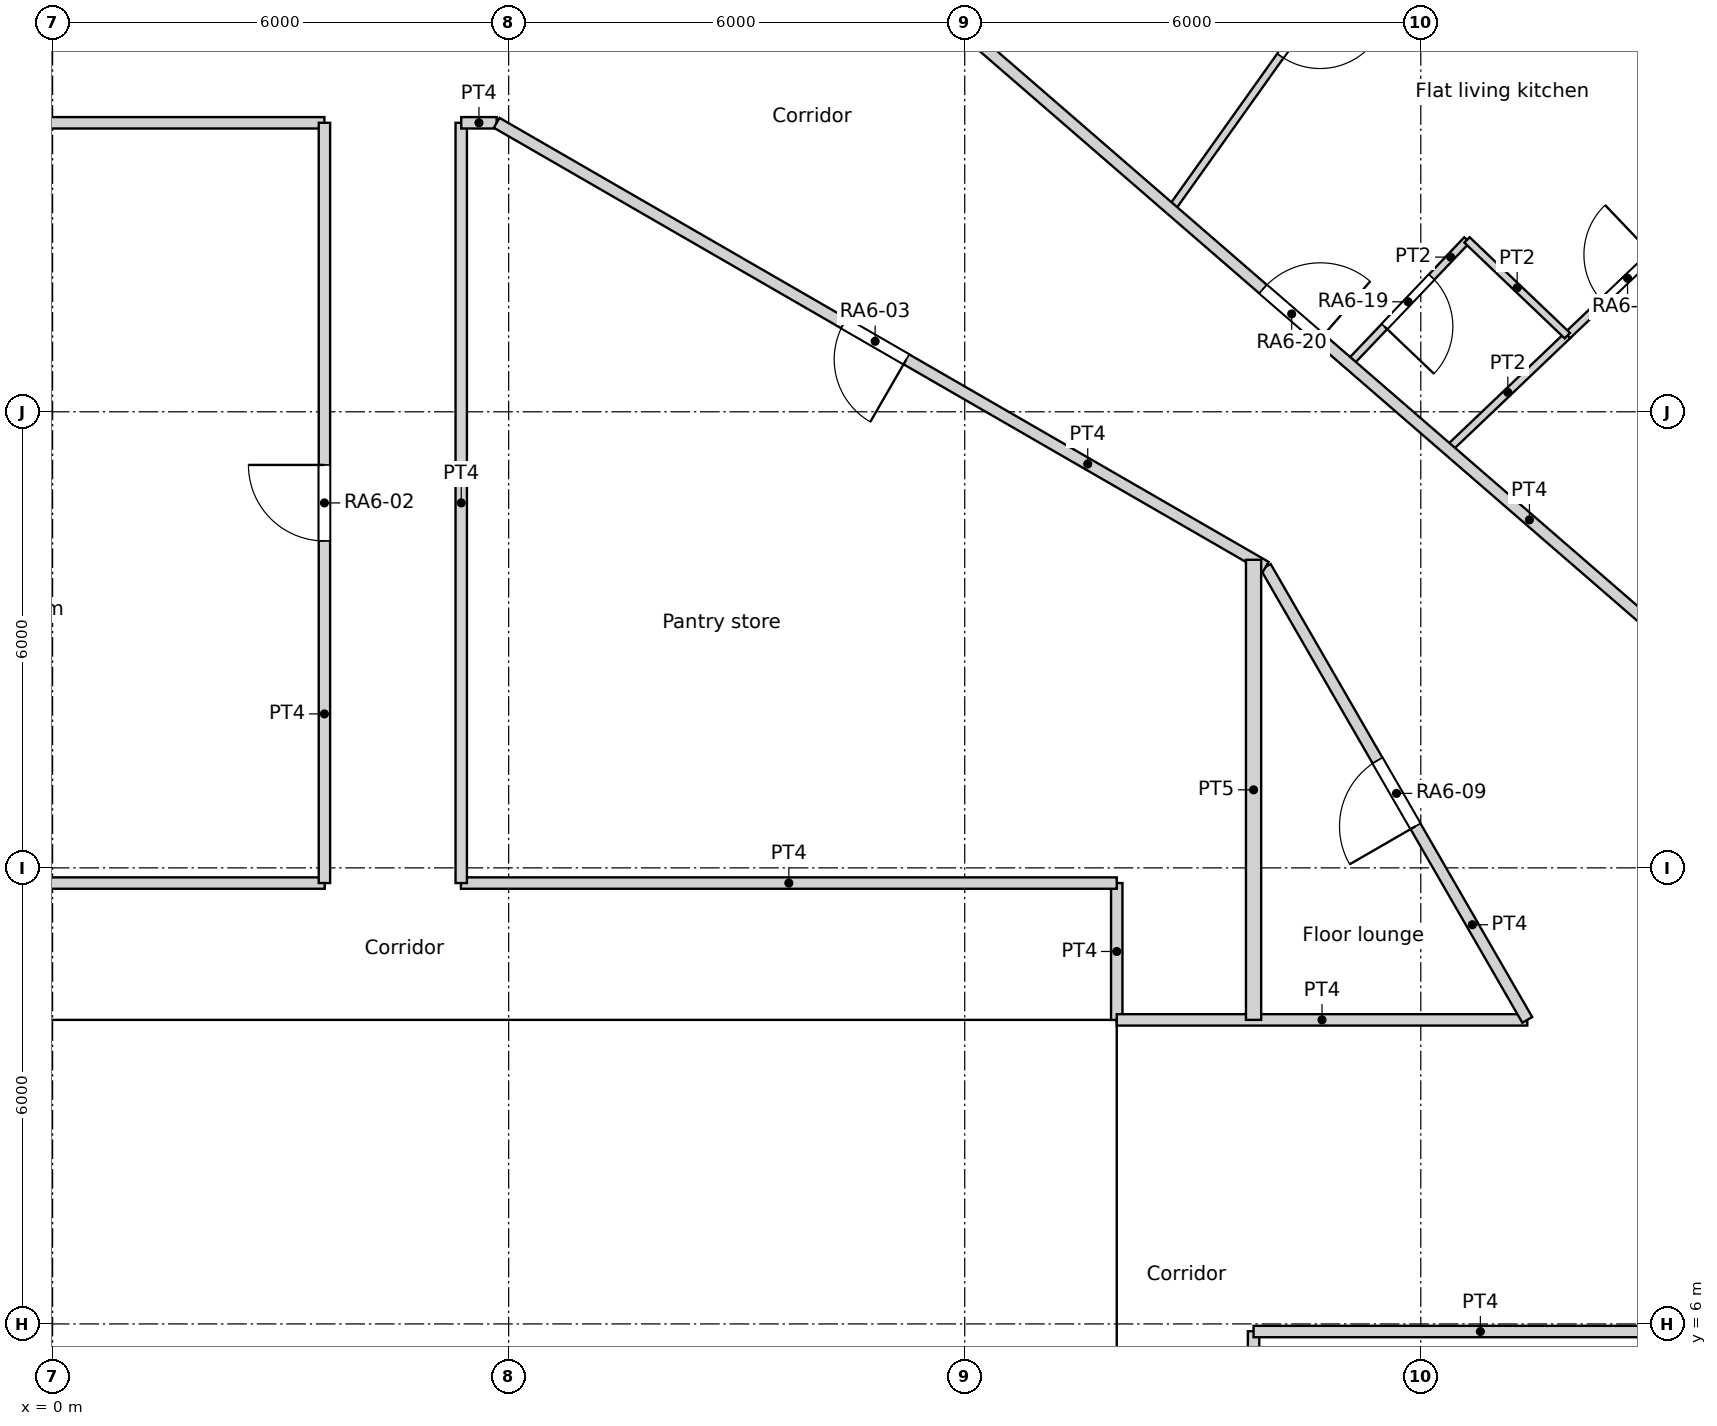
"""IFC4 building model, lengths in metres.
Left out: names, types, materials, properties, quantities, classifications, styles, units other than length and angle.
Written with IfcOpenShell. Run it as: python <this file> out.ifc"""

import sys

from ifc_helpers import new_model, si_unit, direction, frame, frame_2d, origin, origin_2d, place, context, subcontext, project, spatial, rectangle, circle, extrude, element, fill, save


model = new_model("IFC4")
c1 = context("Model", 3, precision=1e-05, world=origin(), true_north=direction((0.0, 1.0)))
c2 = subcontext(c1, "Body", "Model", "MODEL_VIEW")
j1 = project(units=[si_unit("LENGTHUNIT", "METRE"), si_unit("PLANEANGLEUNIT", "RADIAN")], contexts=[c1])
p1 = place(None, origin())
s1 = spatial("IfcSite", under=j1, at=p1, CompositionType="ELEMENT")
p2 = place(p1, origin())
s2 = spatial("IfcBuilding", under=s1, at=p2, CompositionType="ELEMENT")
p3 = place(p2, frame((0.0, 0.0, 82.2)))
s3 = spatial("IfcBuildingStorey", under=s2, at=p3, CompositionType="ELEMENT", Elevation=82.2)
for number, where, z_axis, x_axis in (
    (1, (18.805, 15.779, 0.0), (0.0, 0.0, 1.0), (1.0, 0.0, 0.0)),
    (2, (14.659, 19.69, 0.0), (0.0, 0.0, 1.0), (1.0, 0.0, 0.0)),
    (3, (9.723, 22.54, 0.0), (0.0, 0.0, 1.0), (1.0, 0.0, 0.0)),
):
    element("IfcColumn", number, at=place(p3, frame(where, z_axis=z_axis, x_axis=x_axis)), inside=s3, PredefinedType="COLUMN", context=c2, shape_type="SweptSolid", body=[
        extrude(circle(Radius=0.65, at=origin_2d()), origin(), (0.0, 0.0, 1.0), 3.6),
    ])
for number, where, z_axis, x_axis in (
    (4, (17.986, 5.548, 0.0), (0.0, 0.0, 1.0), (1.0, 0.0, 0.0)),
    (5, (15.552, 10.603, 0.0), (0.0, 0.0, 1.0), (1.0, 0.0, 0.0)),
    (6, (11.735, 14.716, 0.0), (0.0, 0.0, 1.0), (1.0, 0.0, 0.0)),
    (7, (6.876, 17.521, 0.0), (0.0, 0.0, 1.0), (1.0, 0.0, 0.0)),
    (8, (1.406, 18.77, 0.0), (0.0, 0.0, 1.0), (1.0, 0.0, 0.0)),
):
    element("IfcColumn", number, at=place(p3, frame(where, z_axis=z_axis, x_axis=x_axis)), inside=s3, PredefinedType="COLUMN", context=c2, shape_type="SweptSolid", body=[
        extrude(circle(Radius=0.7, at=origin_2d()), origin(), (0.0, 0.0, 1.0), 3.6),
    ])
p4 = place(p3, frame((22.707, 21.651, 0.0), z_axis=(0.0, 0.0, 1.0), x_axis=(-0.723744206617, 0.690068346896, 0.0)))
e9 = element("IfcWall", 9, at=p4, inside=s3, PredefinedType="SOLIDWALL", context=c2, shape_type="SweptSolid", body=[
    extrude(rectangle(XDim=2.98, YDim=0.3, at=frame_2d((1.49, 0.0))), origin(), (0.0, 0.0, 1.0), 3.15),
])
p5 = place(p4, frame((1.49, 0.0, 1.55)))
e10 = element("IfcOpeningElement", 10, at=p5, cuts=e9, PredefinedType="OPENING", context=c2, shape_type="SweptSolid", body=[
    extrude(circle(Radius=0.9, at=origin_2d()), frame((0.0, 0.16, 0.0), z_axis=(0.0, -1.0, 0.0), x_axis=(1.0, 0.0, 0.0)), (0.0, 0.0, 1.0), 0.32),
])
p6 = place(p3, frame((-14.0, 9.4, 0.0), z_axis=(0.0, 0.0, 1.0), x_axis=(1.0, 0.0, 0.0)))
e11 = element("IfcWall", 11, at=p6, inside=s3, PredefinedType="SOLIDWALL", context=c2, shape_type="SweptSolid", body=[
    extrude(rectangle(XDim=28.0, YDim=1.2, at=frame_2d((14.0, 0.0))), origin(), (0.0, 0.0, 1.0), 3.6),
])
p7 = place(p6, frame((9.8, 0.0, 0.0)))
e12 = element("IfcOpeningElement", 12, at=p7, cuts=e11, PredefinedType="OPENING", context=c2, shape_type="SweptSolid", body=[
    extrude(rectangle(XDim=1.8, YDim=2.1, at=frame_2d((0.9, 1.05))), frame((0.0, 0.6, 0.0), z_axis=(0.0, -1.0, 0.0), x_axis=(1.0, 0.0, 0.0)), (0.0, 0.0, 1.0), 1.2),
])
p8 = place(p3, frame((13.4, -8.8, 0.0), z_axis=(0.0, 0.0, 1.0), x_axis=(0.0, 1.0, 0.0)))
e13 = element("IfcWall", 13, at=p8, inside=s3, PredefinedType="SOLIDWALL", context=c2, shape_type="SweptSolid", body=[
    extrude(rectangle(XDim=17.6, YDim=1.2, at=frame_2d((8.8, 0.0))), origin(), (0.0, 0.0, 1.0), 3.6),
])
p9 = place(p8, frame((6.3, 0.0, 0.0)))
e14 = element("IfcOpeningElement", 14, at=p9, cuts=e13, PredefinedType="OPENING", context=c2, shape_type="SweptSolid", body=[
    extrude(rectangle(XDim=1.0, YDim=2.1, at=frame_2d((0.5, 1.05))), frame((0.0, 0.6, 0.0), z_axis=(0.0, -1.0, 0.0), x_axis=(1.0, 0.0, 0.0)), (0.0, 0.0, 1.0), 1.2),
])
for number, where, z_axis, x_axis in (
    (15, (0.55, 3.25, 0.0), (0.0, 0.0, 1.0), (0.0, 1.0, 0.0)),
    (16, (3.35, 3.25, 0.0), (0.0, 0.0, 1.0), (0.0, 1.0, 0.0)),
    (17, (6.15, 3.25, 0.0), (0.0, 0.0, 1.0), (0.0, 1.0, 0.0)),
):
    element("IfcWall", number, at=place(p3, frame(where, z_axis=z_axis, x_axis=x_axis)), inside=s3, PredefinedType="SOLIDWALL", context=c2, shape_type="SweptSolid", body=[
        extrude(rectangle(XDim=3.15, YDim=0.3, at=frame_2d((1.575, 0.0))), origin(), (0.0, 0.0, 1.0), 3.15),
    ])
p10 = place(p3, frame((9.05, -8.8, 0.0), z_axis=(0.0, 0.0, 1.0), x_axis=(0.0, 1.0, 0.0)))
e18 = element("IfcWall", 18, at=p10, inside=s3, PredefinedType="SOLIDWALL", context=c2, shape_type="SweptSolid", body=[
    extrude(rectangle(XDim=17.6, YDim=0.3, at=frame_2d((8.8, 0.0))), origin(), (0.0, 0.0, 1.0), 3.15),
])
p11 = place(p10, frame((8.8, 0.0, 0.0)))
e19 = element("IfcOpeningElement", 19, at=p11, cuts=e18, PredefinedType="OPENING", context=c2, shape_type="SweptSolid", body=[
    extrude(rectangle(XDim=1.8, YDim=2.1, at=frame_2d((0.9, 1.05))), frame((0.0, 0.15, 0.0), z_axis=(0.0, -1.0, 0.0), x_axis=(1.0, 0.0, 0.0)), (0.0, 0.0, 1.0), 0.3),
])
p12 = place(p3, frame((-8.9, 6.55, 0.0), z_axis=(0.0, 0.0, 1.0), x_axis=(1.0, 0.0, 0.0)))
e20 = element("IfcWall", 20, at=p12, inside=s3, PredefinedType="SOLIDWALL", context=c2, shape_type="SweptSolid", body=[
    extrude(rectangle(XDim=17.8, YDim=0.3, at=frame_2d((8.9, 0.0))), origin(), (0.0, 0.0, 1.0), 3.15),
])
p13 = place(p12, frame((4.75, 0.0, 0.0)))
e21 = element("IfcOpeningElement", 21, at=p13, cuts=e20, PredefinedType="OPENING", context=c2, shape_type="SweptSolid", body=[
    extrude(rectangle(XDim=1.7, YDim=2.1, at=frame_2d((0.85, 1.05))), frame((0.0, 0.15, 0.0), z_axis=(0.0, -1.0, 0.0), x_axis=(1.0, 0.0, 0.0)), (0.0, 0.0, 1.0), 0.3),
])
p14 = place(p3, frame((0.85, 6.7, 0.0), z_axis=(0.0, 0.0, 1.0), x_axis=(0.0, 1.0, 0.0)))
e22 = element("IfcWall", 22, at=p14, inside=s3, PredefinedType="SOLIDWALL", context=c2, shape_type="SweptSolid", body=[
    extrude(rectangle(XDim=2.1, YDim=0.3, at=frame_2d((1.05, 0.0))), origin(), (0.0, 0.0, 1.0), 3.15),
])
p15 = place(p3, frame((12.2, 4.7, 0.0), z_axis=(0.0, 0.0, 1.0), x_axis=(0.0, 1.0, 0.0)))
e23 = element("IfcWall", 23, at=p15, inside=s3, PredefinedType="SOLIDWALL", context=c2, shape_type="SweptSolid", body=[
    extrude(rectangle(XDim=4.1, YDim=1.2, at=frame_2d((2.05, 0.0))), origin(), (0.0, 0.0, 1.0), 3.15),
])
p16 = place(p3, frame((9.2, 8.2, 0.0), z_axis=(0.0, 0.0, 1.0), x_axis=(1.0, 0.0, 0.0)))
e24 = element("IfcWall", 24, at=p16, inside=s3, PredefinedType="SOLIDWALL", context=c2, shape_type="SweptSolid", body=[
    extrude(rectangle(XDim=2.4, YDim=1.2, at=frame_2d((1.2, 0.0))), origin(), (0.0, 0.0, 1.0), 3.15),
])
p17 = place(p3, frame((-4.164, 11.8, 0.0), z_axis=(0.0, 0.0, 1.0), x_axis=(1.0, 0.0, 0.0)))
e25 = element("IfcWall", 25, at=p17, inside=s3, PredefinedType="PARTITIONING", context=c2, shape_type="SweptSolid", body=[
    extrude(rectangle(XDim=7.744, YDim=0.15, at=frame_2d((3.872, 0.0))), origin(), (0.0, 0.0, 1.0), 3.15),
])
p18 = place(p3, frame((5.372, 11.8, 0.0), z_axis=(0.0, 0.0, 1.0), x_axis=(1.0, 0.0, 0.0)))
e26 = element("IfcWall", 26, at=p18, inside=s3, PredefinedType="PARTITIONING", context=c2, shape_type="SweptSolid", body=[
    extrude(rectangle(XDim=8.628, YDim=0.15, at=frame_2d((4.314, 0.0))), origin(), (0.0, 0.0, 1.0), 3.15),
])
p19 = place(p3, frame((14.0, 10.0, 0.0), z_axis=(0.0, 0.0, 1.0), x_axis=(0.0, 1.0, 0.0)))
e27 = element("IfcWall", 27, at=p19, inside=s3, PredefinedType="PARTITIONING", context=c2, shape_type="SweptSolid", body=[
    extrude(rectangle(XDim=1.8, YDim=0.15, at=frame_2d((0.9, 0.0))), origin(), (0.0, 0.0, 1.0), 3.15),
])
p20 = place(p3, frame((14.0, 10.0, 0.0), z_axis=(0.0, 0.0, 1.0), x_axis=(1.0, 0.0, 0.0)))
e28 = element("IfcWall", 28, at=p20, inside=s3, PredefinedType="PARTITIONING", context=c2, shape_type="SweptSolid", body=[
    extrude(rectangle(XDim=5.401, YDim=0.15, at=frame_2d((2.7, 0.0))), origin(), (0.0, 0.0, 1.0), 3.15),
])
p21 = place(p3, frame((15.8, -5.904, 0.0), z_axis=(0.0, 0.0, 1.0), x_axis=(0.0, 1.0, 0.0)))
e29 = element("IfcWall", 29, at=p21, inside=s3, PredefinedType="PARTITIONING", context=c2, shape_type="SweptSolid", body=[
    extrude(rectangle(XDim=11.808, YDim=0.15, at=frame_2d((5.904, 0.0))), origin(), (0.0, 0.0, 1.0), 3.15),
])
p22 = place(p21, frame((5.404, 0.0, 0.0)))
e30 = element("IfcOpeningElement", 30, at=p22, cuts=e29, PredefinedType="OPENING", context=c2, shape_type="SweptSolid", body=[
    extrude(rectangle(XDim=1.0, YDim=2.04, at=frame_2d((0.5, 1.02))), frame((0.0, 0.075, 0.0), z_axis=(0.0, -1.0, 0.0), x_axis=(1.0, 0.0, 0.0)), (0.0, 0.0, 1.0), 0.15),
])
p23 = place(p3, frame((15.8, 5.9, 0.0), z_axis=(0.0, 0.0, 1.0), x_axis=(1.0, 0.0, 0.0)))
e31 = element("IfcWall", 31, at=p23, inside=s3, PredefinedType="PARTITIONING", context=c2, shape_type="SweptSolid", body=[
    extrude(rectangle(XDim=5.968, YDim=0.15, at=frame_2d((2.984, 0.0))), origin(), (0.0, 0.0, 1.0), 3.15),
])
p24 = place(p3, frame((15.96, 15.96, 0.0), z_axis=(0.0, 0.0, 1.0), x_axis=(0.499992689227, -0.86602962462, 0.0)))
e32 = element("IfcWall", 32, at=p24, inside=s3, PredefinedType="PARTITIONING", context=c2, shape_type="SweptSolid", body=[
    extrude(rectangle(XDim=6.882, YDim=0.15, at=frame_2d((3.441, 0.0))), origin(), (0.0, 0.0, 1.0), 3.15),
])
p25 = place(p24, frame((2.941, 0.0, 0.0)))
e33 = element("IfcOpeningElement", 33, at=p25, cuts=e32, PredefinedType="OPENING", context=c2, shape_type="SweptSolid", body=[
    extrude(rectangle(XDim=1.0, YDim=2.04, at=frame_2d((0.5, 1.02))), frame((0.0, 0.075, 0.0), z_axis=(0.0, -1.0, 0.0), x_axis=(1.0, 0.0, 0.0)), (0.0, 0.0, 1.0), 0.15),
])
p26 = place(p3, frame((10.932, 23.939, 0.0), z_axis=(0.0, 0.0, 1.0), x_axis=(0.755823777664, -0.654775088956, 0.0)))
e34 = element("IfcWall", 34, at=p26, inside=s3, PredefinedType="PARTITIONING", context=c2, shape_type="SweptSolid", body=[
    extrude(rectangle(XDim=14.83, YDim=0.15, at=frame_2d((7.415, 0.0))), origin(), (0.0, 0.0, 1.0), 3.15),
])
p27 = place(p26, frame((6.604, 0.0, 0.0)))
e35 = element("IfcOpeningElement", 35, at=p27, cuts=e34, PredefinedType="OPENING", context=c2, shape_type="SweptSolid", body=[
    extrude(rectangle(XDim=1.0, YDim=2.1, at=frame_2d((0.5, 1.05))), frame((0.0, 0.075, 0.0), z_axis=(0.0, -1.0, 0.0), x_axis=(1.0, 0.0, 0.0)), (0.0, 0.0, 1.0), 0.15),
])
p28 = place(p3, frame((3.576, 11.8, 0.0), z_axis=(0.0, 0.0, 1.0), x_axis=(0.0, 1.0, 0.0)))
e36 = element("IfcWall", 36, at=p28, inside=s3, PredefinedType="PARTITIONING", context=c2, shape_type="SweptSolid", body=[
    extrude(rectangle(XDim=10.002, YDim=0.15, at=frame_2d((5.001, 0.0))), origin(), (0.0, 0.0, 1.0), 3.15),
])
p29 = place(p28, frame((4.501, 0.0, 0.0)))
e37 = element("IfcOpeningElement", 37, at=p29, cuts=e36, PredefinedType="OPENING", context=c2, shape_type="SweptSolid", body=[
    extrude(rectangle(XDim=1.0, YDim=2.04, at=frame_2d((0.5, 1.02))), frame((0.0, 0.075, 0.0), z_axis=(0.0, -1.0, 0.0), x_axis=(1.0, 0.0, 0.0)), (0.0, 0.0, 1.0), 0.15),
])
p30 = place(p3, frame((-4.16, 21.802, 0.0), z_axis=(0.0, 0.0, 1.0), x_axis=(1.0, 0.0, 0.0)))
e38 = element("IfcWall", 38, at=p30, inside=s3, PredefinedType="PARTITIONING", context=c2, shape_type="SweptSolid", body=[
    extrude(rectangle(XDim=7.736, YDim=0.15, at=frame_2d((3.868, 0.0))), origin(), (0.0, 0.0, 1.0), 3.15),
])
p31 = place(p3, frame((5.842, 21.802, 0.0), z_axis=(0.0, 0.0, 1.0), x_axis=(0.866031778836, -0.499988957924, 0.0)))
e39 = element("IfcWall", 39, at=p31, inside=s3, PredefinedType="PARTITIONING", context=c2, shape_type="SweptSolid", body=[
    extrude(rectangle(XDim=11.683, YDim=0.15, at=frame_2d((5.842, 0.0))), origin(), (0.0, 0.0, 1.0), 3.15),
])
p32 = place(p31, frame((5.274, 0.0, 0.0)))
e40 = element("IfcOpeningElement", 40, at=p32, cuts=e39, PredefinedType="OPENING", context=c2, shape_type="SweptSolid", body=[
    extrude(rectangle(XDim=0.95, YDim=2.1, at=frame_2d((0.475, 1.05))), frame((0.0, 0.075, 0.0), z_axis=(0.0, -1.0, 0.0), x_axis=(1.0, 0.0, 0.0)), (0.0, 0.0, 1.0), 0.15),
])
p33 = place(p3, frame((5.376, 21.802, 0.0), z_axis=(0.0, 0.0, 1.0), x_axis=(1.0, 0.0, 0.0)))
e41 = element("IfcWall", 41, at=p33, inside=s3, PredefinedType="PARTITIONING", context=c2, shape_type="SweptSolid", body=[
    extrude(rectangle(XDim=0.466, YDim=0.15, at=frame_2d((0.233, 0.0))), origin(), (0.0, 0.0, 1.0), 3.15),
])
p34 = place(p3, frame((5.376, 11.8, 0.0), z_axis=(0.0, 0.0, 1.0), x_axis=(0.0, 1.0, 0.0)))
e42 = element("IfcWall", 42, at=p34, inside=s3, PredefinedType="PARTITIONING", context=c2, shape_type="SweptSolid", body=[
    extrude(rectangle(XDim=10.002, YDim=0.15, at=frame_2d((5.001, 0.0))), origin(), (0.0, 0.0, 1.0), 3.15),
])
p35 = place(p3, frame((15.8, 10.0, 0.0), z_axis=(0.0, 0.0, 1.0), x_axis=(0.0, 1.0, 0.0)))
e43 = element("IfcWall", 43, at=p35, inside=s3, PredefinedType="PARTITIONING", context=c2, shape_type="SweptSolid", body=[
    extrude(rectangle(XDim=6.053, YDim=0.2, at=frame_2d((3.026, 0.0))), origin(), (0.0, 0.0, 1.0), 3.15),
])
p36 = place(p3, frame((19.928, 19.002, 0.0), z_axis=(0.0, 0.0, 1.0), x_axis=(0.723815182922, 0.689993899228, 0.0)))
e44 = element("IfcWall", 44, at=p36, inside=s3, PredefinedType="PARTITIONING", context=c2, shape_type="SweptSolid", body=[
    extrude(rectangle(XDim=3.689, YDim=0.1, at=frame_2d((1.844, 0.0))), origin(), (0.0, 0.0, 1.0), 3.15),
])
p37 = place(p36, frame((0.645, 0.0, 0.0)))
e45 = element("IfcOpeningElement", 45, at=p37, cuts=e44, PredefinedType="OPENING", context=c2, shape_type="SweptSolid", body=[
    extrude(rectangle(XDim=0.9, YDim=2.1, at=frame_2d((0.45, 1.05))), frame((0.0, 0.05, 0.0), z_axis=(0.0, -1.0, 0.0), x_axis=(1.0, 0.0, 0.0)), (0.0, 0.0, 1.0), 0.1),
])
p38 = place(p3, frame((14.715, 20.664, 0.0), z_axis=(0.0, 0.0, 1.0), x_axis=(0.580007254017, 0.814611309329, 0.0)))
e46 = element("IfcWall", 46, at=p38, inside=s3, PredefinedType="PARTITIONING", context=c2, shape_type="SweptSolid", body=[
    extrude(rectangle(XDim=5.857, YDim=0.1, at=frame_2d((2.928, 0.0))), origin(), (0.0, 0.0, 1.0), 3.15),
])
p39 = place(p38, frame((2.478, 0.0, 0.0)))
e47 = element("IfcOpeningElement", 47, at=p39, cuts=e46, PredefinedType="OPENING", context=c2, shape_type="SweptSolid", body=[
    extrude(rectangle(XDim=0.9, YDim=2.1, at=frame_2d((0.45, 1.05))), frame((0.0, 0.05, 0.0), z_axis=(0.0, -1.0, 0.0), x_axis=(1.0, 0.0, 0.0)), (0.0, 0.0, 1.0), 0.1),
])
p40 = place(p3, frame((18.608, 20.261, 0.0), z_axis=(0.0, 0.0, 1.0), x_axis=(0.723638053237, -0.690179663499, 0.0)))
e48 = element("IfcWall", 48, at=p40, inside=s3, PredefinedType="PARTITIONING", context=c2, shape_type="SweptSolid", body=[
    extrude(rectangle(XDim=1.824, YDim=0.1, at=frame_2d((0.912, 0.0))), origin(), (0.0, 0.0, 1.0), 3.15),
])
p41 = place(p3, frame((17.057, 18.634, 0.0), z_axis=(0.0, 0.0, 1.0), x_axis=(0.690015794307, 0.723794310289, 0.0)))
e49 = element("IfcWall", 49, at=p41, inside=s3, PredefinedType="PARTITIONING", context=c2, shape_type="SweptSolid", body=[
    extrude(rectangle(XDim=2.248, YDim=0.1, at=frame_2d((1.124, 0.0))), origin(), (0.0, 0.0, 1.0), 3.15),
])
p42 = place(p41, frame((0.674, 0.0, 0.0)))
e50 = element("IfcOpeningElement", 50, at=p42, cuts=e49, PredefinedType="OPENING", context=c2, shape_type="SweptSolid", body=[
    extrude(rectangle(XDim=0.9, YDim=2.0, at=frame_2d((0.45, 1.0))), frame((0.0, 0.05, 0.0), z_axis=(0.0, -1.0, 0.0), x_axis=(1.0, 0.0, 0.0)), (0.0, 0.0, 1.0), 0.1),
])
p43 = place(p3, frame((18.359, 17.506, 0.0), z_axis=(0.0, 0.0, 1.0), x_axis=(0.723990848888, 0.689809575699, 0.0)))
e51 = element("IfcWall", 51, at=p43, inside=s3, PredefinedType="PARTITIONING", context=c2, shape_type="SweptSolid", body=[
    extrude(rectangle(XDim=2.171, YDim=0.1, at=frame_2d((1.086, 0.0))), origin(), (0.0, 0.0, 1.0), 3.15),
])
p44 = place(p29, origin())
e52 = element("IfcDoor", 52, at=p44, inside=s3, OperationType="SINGLE_SWING_RIGHT", PredefinedType="DOOR", context=c2, shape_type="SweptSolid", body=[
    extrude(rectangle(XDim=1.0, YDim=2.04, at=frame_2d((0.5, 1.02))), frame((0.0, 0.025, 0.0), z_axis=(0.0, -1.0, 0.0), x_axis=(1.0, 0.0, 0.0)), (0.0, 0.0, 1.0), 0.05),
])
fill(e37, e52)
p45 = place(p32, origin())
e53 = element("IfcDoor", 53, at=p45, inside=s3, OperationType="SINGLE_SWING_LEFT", PredefinedType="DOOR", context=c2, shape_type="SweptSolid", body=[
    extrude(rectangle(XDim=0.95, YDim=2.1, at=frame_2d((0.475, 1.05))), frame((0.0, 0.025, 0.0), z_axis=(0.0, -1.0, 0.0), x_axis=(1.0, 0.0, 0.0)), (0.0, 0.0, 1.0), 0.05),
])
fill(e40, e53)
p46 = place(p25, origin())
e54 = element("IfcDoor", 54, at=p46, inside=s3, OperationType="SINGLE_SWING_LEFT", PredefinedType="DOOR", context=c2, shape_type="SweptSolid", body=[
    extrude(rectangle(XDim=1.0, YDim=2.04, at=frame_2d((0.5, 1.02))), frame((0.0, 0.025, 0.0), z_axis=(0.0, -1.0, 0.0), x_axis=(1.0, 0.0, 0.0)), (0.0, 0.0, 1.0), 0.05),
])
fill(e33, e54)
p47 = place(p37, origin())
e55 = element("IfcDoor", 55, at=p47, inside=s3, OperationType="SINGLE_SWING_RIGHT", PredefinedType="DOOR", context=c2, shape_type="SweptSolid", body=[
    extrude(rectangle(XDim=0.9, YDim=2.1, at=frame_2d((0.45, 1.05))), frame((0.0, 0.025, 0.0), z_axis=(0.0, -1.0, 0.0), x_axis=(1.0, 0.0, 0.0)), (0.0, 0.0, 1.0), 0.05),
])
fill(e45, e55)
p48 = place(p39, origin())
e56 = element("IfcDoor", 56, at=p48, inside=s3, OperationType="SINGLE_SWING_LEFT", PredefinedType="DOOR", context=c2, shape_type="SweptSolid", body=[
    extrude(rectangle(XDim=0.9, YDim=2.1, at=frame_2d((0.45, 1.05))), frame((0.0, 0.025, 0.0), z_axis=(0.0, -1.0, 0.0), x_axis=(1.0, 0.0, 0.0)), (0.0, 0.0, 1.0), 0.05),
])
fill(e47, e56)
p49 = place(p42, origin())
e57 = element("IfcDoor", 57, at=p49, inside=s3, OperationType="SINGLE_SWING_RIGHT", PredefinedType="DOOR", context=c2, shape_type="SweptSolid", body=[
    extrude(rectangle(XDim=0.9, YDim=2.0, at=frame_2d((0.45, 1.0))), frame((0.0, 0.025, 0.0), z_axis=(0.0, -1.0, 0.0), x_axis=(1.0, 0.0, 0.0)), (0.0, 0.0, 1.0), 0.05),
])
fill(e50, e57)
p50 = place(p27, origin())
e58 = element("IfcDoor", 58, at=p50, inside=s3, OperationType="SINGLE_SWING_RIGHT", PredefinedType="DOOR", context=c2, shape_type="SweptSolid", body=[
    extrude(rectangle(XDim=1.0, YDim=2.1, at=frame_2d((0.5, 1.05))), frame((0.0, 0.025, 0.0), z_axis=(0.0, -1.0, 0.0), x_axis=(1.0, 0.0, 0.0)), (0.0, 0.0, 1.0), 0.05),
])
fill(e35, e58)
save(model, sys.argv[1])
